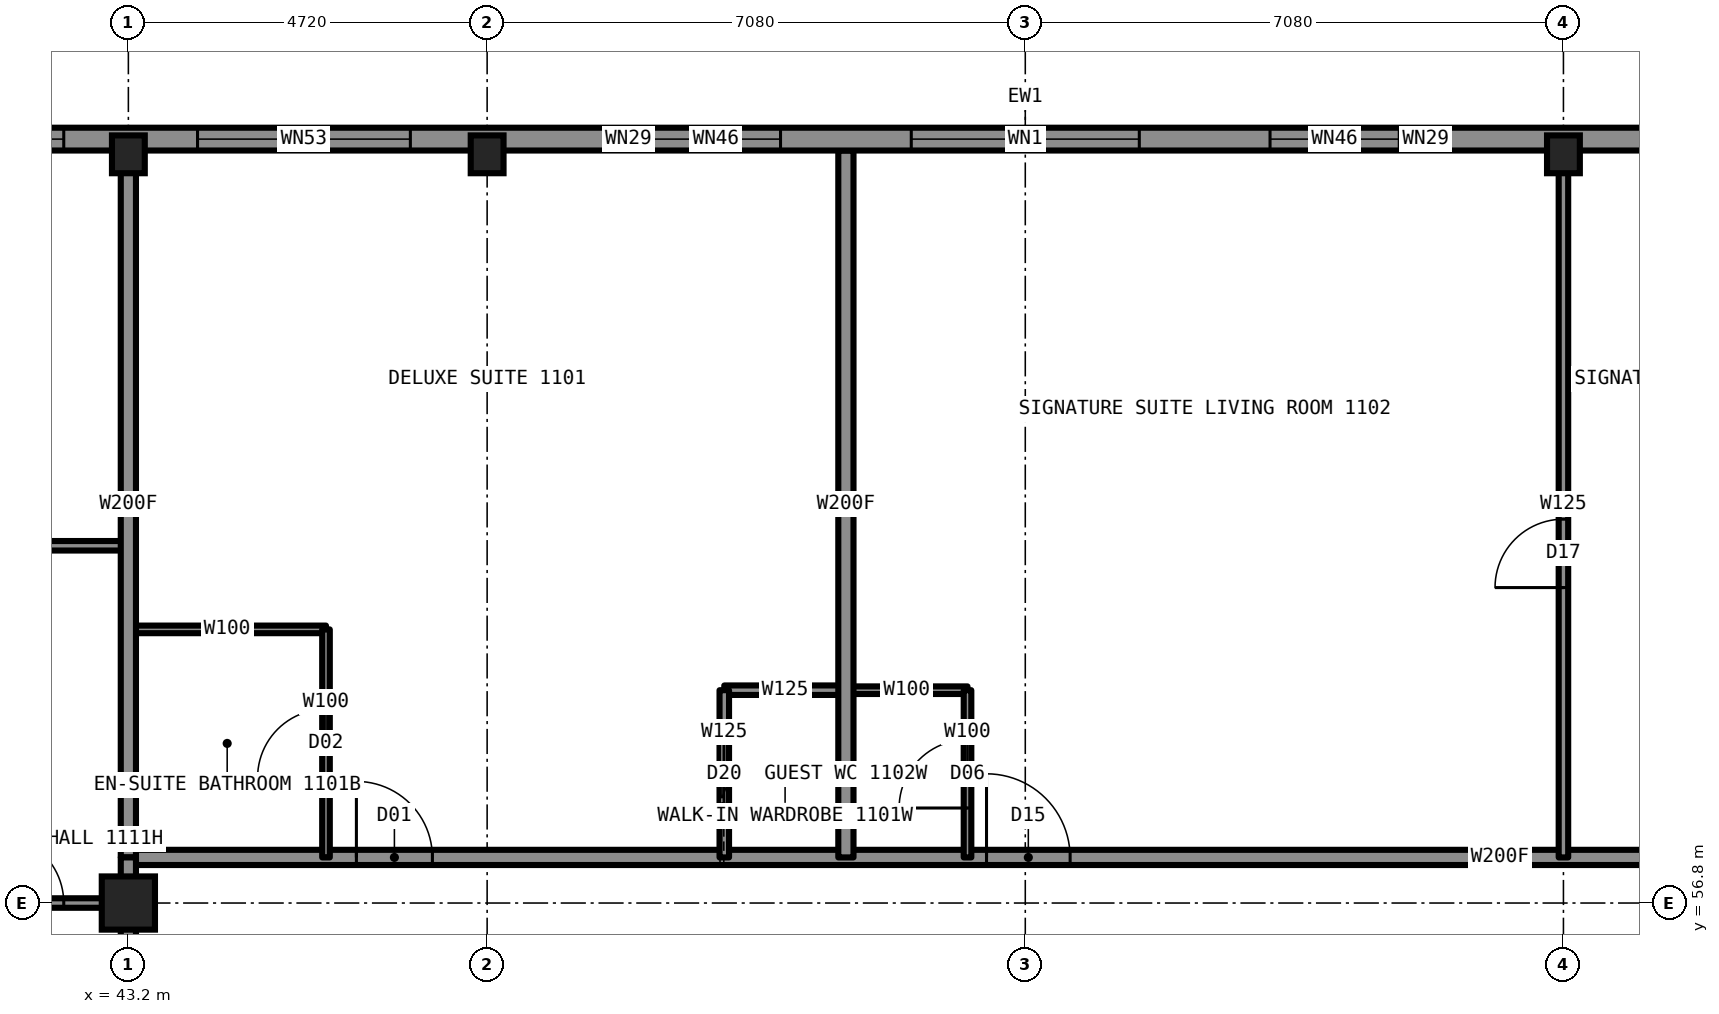
"""IFC4 building model, lengths in metres.
Left out: names, types, materials, properties, quantities, classifications, styles, units other than length and angle.
Written with IfcOpenShell. Run it as: python <this file> out.ifc"""

import sys

from ifc_helpers import new_model, si_unit, direction, frame, frame_2d, origin, origin_2d, place, context, subcontext, project, spatial, rectangle, hollow_rectangle, i_section, extrude, element, fill, save


model = new_model("IFC4")
c1 = context("Model", 3, precision=1e-05, world=origin(), true_north=direction((0.0, 1.0)))
c2 = subcontext(c1, "Body", "Model", "MODEL_VIEW")
j1 = project(units=[si_unit("LENGTHUNIT", "METRE"), si_unit("PLANEANGLEUNIT", "RADIAN")], contexts=[c1])
p1 = place(None, origin())
s1 = spatial("IfcSite", under=j1, at=p1, CompositionType="ELEMENT")
p2 = place(p1, origin())
s2 = spatial("IfcBuilding", under=s1, at=p2, CompositionType="ELEMENT")
p3 = place(p2, frame((0.0, 0.0, 39.0)))
s3 = spatial("IfcBuildingStorey", under=s2, at=p3, CompositionType="ELEMENT", Elevation=39.0)
for number, where, z_axis, x_axis in (
    (1, (43.2, 66.65, 0.0), (0.0, 0.0, 1.0), (1.0, 0.0, 0.0)),
    (2, (47.92, 66.65, 0.0), (0.0, 0.0, 1.0), (1.0, 0.0, 0.0)),
    (3, (62.08, 66.65, 0.0), (0.0, 0.0, 1.0), (1.0, 0.0, 0.0)),
):
    element("IfcColumn", number, at=place(p3, frame(where, z_axis=z_axis, x_axis=x_axis)), inside=s3, PredefinedType="COLUMN", context=c2, shape_type="SweptSolid", body=[
        extrude(i_section(OverallWidth=0.432, OverallDepth=0.498, WebThickness=0.056, FlangeThickness=0.089, at=origin_2d()), origin(), (0.0, 0.0, 1.0), 3.5),
    ])
p4 = place(p3, frame((43.2, 56.8, 0.0), z_axis=(0.0, 0.0, 1.0), x_axis=(1.0, 0.0, 0.0)))
e4 = element("IfcColumn", 4, at=p4, inside=s3, PredefinedType="COLUMN", context=c2, shape_type="SweptSolid", body=[
    extrude(hollow_rectangle(XDim=0.7, YDim=0.7, WallThickness=0.06, at=origin_2d()), origin(), (0.0, 0.0, 1.0), 3.5),
])
p5 = place(p3, frame((33.3, 56.8, 0.0), z_axis=(0.0, 0.0, 1.0), x_axis=(1.0, 0.0, 0.0)))
e5 = element("IfcWall", 5, at=p5, inside=s3, PredefinedType="PARTITIONING", context=c2, shape_type="SweptSolid", body=[
    extrude(rectangle(XDim=9.9, YDim=0.125, at=frame_2d((4.95, 0.0))), origin(), (0.0, 0.0, 1.0), 2.573),
])
p6 = place(p5, frame((8.15, 0.0, 0.0)))
e6 = element("IfcOpeningElement", 6, at=p6, cuts=e5, PredefinedType="OPENING", context=c2, shape_type="SweptSolid", body=[
    extrude(rectangle(XDim=0.9, YDim=2.2, at=frame_2d((0.45, 1.1))), frame((0.0, 0.073, 0.0), z_axis=(0.0, -1.0, 0.0), x_axis=(1.0, 0.0, 0.0)), (0.0, 0.0, 1.0), 0.145),
])
p7 = place(p3, frame((43.2, 57.4, 0.0), z_axis=(0.0, 0.0, 1.0), x_axis=(1.0, 0.0, 0.0)))
e7 = element("IfcWall", 7, at=p7, inside=s3, PredefinedType="PARTITIONING", context=c2, shape_type="SweptSolid", body=[
    extrude(rectangle(XDim=23.6, YDim=0.2, at=frame_2d((11.8, 0.0))), origin(), (0.0, 0.0, 1.0), 3.33),
])
p8 = place(p7, frame((3.0, 0.0, 0.0)))
e8 = element("IfcOpeningElement", 8, at=p8, cuts=e7, PredefinedType="OPENING", context=c2, shape_type="SweptSolid", body=[
    extrude(rectangle(XDim=1.0, YDim=2.2, at=frame_2d((0.5, 1.1))), frame((0.0, 0.11, 0.0), z_axis=(0.0, -1.0, 0.0), x_axis=(1.0, 0.0, 0.0)), (0.0, 0.0, 1.0), 0.22),
])
p9 = place(p7, frame((11.29, 0.0, 0.0)))
e9 = element("IfcOpeningElement", 9, at=p9, cuts=e7, PredefinedType="OPENING", context=c2, shape_type="SweptSolid", body=[
    extrude(rectangle(XDim=1.1, YDim=2.2, at=frame_2d((0.55, 1.1))), frame((0.0, 0.11, 0.0), z_axis=(0.0, -1.0, 0.0), x_axis=(1.0, 0.0, 0.0)), (0.0, 0.0, 1.0), 0.22),
])
p10 = place(p3, frame((52.64, 59.6, 0.0), z_axis=(0.0, 0.0, 1.0), x_axis=(1.0, 0.0, 0.0)))
e10 = element("IfcWall", 10, at=p10, inside=s3, PredefinedType="PARTITIONING", context=c2, shape_type="SweptSolid", body=[
    extrude(rectangle(XDim=1.6, YDim=0.1, at=frame_2d((0.8, 0.0))), origin(), (0.0, 0.0, 1.0), 3.33),
])
p11 = place(p3, frame((51.04, 59.6, 0.0), z_axis=(0.0, 0.0, 1.0), x_axis=(1.0, 0.0, 0.0)))
e11 = element("IfcWall", 11, at=p11, inside=s3, PredefinedType="PARTITIONING", context=c2, shape_type="SweptSolid", body=[
    extrude(rectangle(XDim=1.6, YDim=0.125, at=frame_2d((0.8, 0.0))), origin(), (0.0, 0.0, 1.0), 3.33),
])
p12 = place(p3, frame((43.2, 60.4, 0.0), z_axis=(0.0, 0.0, 1.0), x_axis=(1.0, 0.0, 0.0)))
e12 = element("IfcWall", 12, at=p12, inside=s3, PredefinedType="PARTITIONING", context=c2, shape_type="SweptSolid", body=[
    extrude(rectangle(XDim=2.6, YDim=0.1, at=frame_2d((1.3, 0.0))), origin(), (0.0, 0.0, 1.0), 3.33),
])
p13 = place(p3, frame((33.306, 61.5, 0.0), z_axis=(0.0, 0.0, 1.0), x_axis=(1.0, 0.0, 0.0)))
e13 = element("IfcWall", 13, at=p13, inside=s3, PredefinedType="PARTITIONING", context=c2, shape_type="SweptSolid", body=[
    extrude(rectangle(XDim=9.894, YDim=0.125, at=frame_2d((4.947, 0.0))), origin(), (0.0, 0.0, 1.0), 3.33),
])
p14 = place(p13, frame((7.244, 0.0, 0.0)))
e14 = element("IfcOpeningElement", 14, at=p14, cuts=e13, PredefinedType="OPENING", context=c2, shape_type="SweptSolid", body=[
    extrude(rectangle(XDim=0.9, YDim=2.2, at=frame_2d((0.45, 1.1))), frame((0.0, 0.073, 0.0), z_axis=(0.0, -1.0, 0.0), x_axis=(1.0, 0.0, 0.0)), (0.0, 0.0, 1.0), 0.145),
])
p15 = place(p3, frame((54.24, 57.4, 0.0), z_axis=(0.0, 0.0, 1.0), x_axis=(0.0, 1.0, 0.0)))
e15 = element("IfcWall", 15, at=p15, inside=s3, PredefinedType="PARTITIONING", context=c2, shape_type="SweptSolid", body=[
    extrude(rectangle(XDim=2.2, YDim=0.1, at=frame_2d((1.1, 0.0))), origin(), (0.0, 0.0, 1.0), 3.33),
])
p16 = place(p15, frame((0.65, 0.0, 0.0)))
e16 = element("IfcOpeningElement", 16, at=p16, cuts=e15, PredefinedType="OPENING", context=c2, shape_type="SweptSolid", body=[
    extrude(rectangle(XDim=0.9, YDim=2.1, at=frame_2d((0.45, 1.05))), frame((0.0, 0.06, 0.0), z_axis=(0.0, -1.0, 0.0), x_axis=(1.0, 0.0, 0.0)), (0.0, 0.0, 1.0), 0.12),
])
p17 = place(p3, frame((43.2, 33.2, 0.0), z_axis=(0.0, 0.0, 1.0), x_axis=(0.0, 1.0, 0.0)))
e17 = element("IfcWall", 17, at=p17, inside=s3, PredefinedType="PARTITIONING", context=c2, shape_type="SweptSolid", body=[
    extrude(rectangle(XDim=23.58, YDim=0.2, at=frame_2d((11.79, 0.0))), origin(), (0.0, 0.0, 1.0), 3.33),
])
p18 = place(p17, frame((7.27, 0.0, 0.0)))
e18 = element("IfcOpeningElement", 18, at=p18, cuts=e17, PredefinedType="OPENING", context=c2, shape_type="SweptSolid", body=[
    extrude(rectangle(XDim=1.0, YDim=2.2, at=frame_2d((0.5, 1.1))), frame((0.0, 0.11, 0.0), z_axis=(0.0, -1.0, 0.0), x_axis=(1.0, 0.0, 0.0)), (0.0, 0.0, 1.0), 0.22),
])
p19 = place(p17, frame((12.44, 0.0, 0.0)))
e19 = element("IfcOpeningElement", 19, at=p19, cuts=e17, PredefinedType="OPENING", context=c2, shape_type="SweptSolid", body=[
    extrude(rectangle(XDim=1.0, YDim=2.2, at=frame_2d((0.5, 1.1))), frame((0.0, 0.11, 0.0), z_axis=(0.0, -1.0, 0.0), x_axis=(1.0, 0.0, 0.0)), (0.0, 0.0, 1.0), 0.22),
])
p20 = place(p17, frame((21.84, 0.0, 0.0)))
e20 = element("IfcOpeningElement", 20, at=p20, cuts=e17, PredefinedType="OPENING", context=c2, shape_type="SweptSolid", body=[
    extrude(rectangle(XDim=1.1, YDim=2.2, at=frame_2d((0.55, 1.1))), frame((0.0, 0.11, 0.0), z_axis=(0.0, -1.0, 0.0), x_axis=(1.0, 0.0, 0.0)), (0.0, 0.0, 1.0), 0.22),
])
p21 = place(p17, frame((0.66, 0.0, 0.0)))
e21 = element("IfcOpeningElement", 21, at=p21, cuts=e17, PredefinedType="OPENING", context=c2, shape_type="SweptSolid", body=[
    extrude(rectangle(XDim=1.1, YDim=2.2, at=frame_2d((0.55, 1.1))), frame((0.0, 0.11, 0.0), z_axis=(0.0, -1.0, 0.0), x_axis=(1.0, 0.0, 0.0)), (0.0, 0.0, 1.0), 0.22),
])
p22 = place(p3, frame((43.2, 57.4, 0.0), z_axis=(0.0, 0.0, 1.0), x_axis=(0.0, 1.0, 0.0)))
e22 = element("IfcWall", 22, at=p22, inside=s3, PredefinedType="PARTITIONING", context=c2, shape_type="SweptSolid", body=[
    extrude(rectangle(XDim=9.3, YDim=0.2, at=frame_2d((4.65, 0.0))), origin(), (0.0, 0.0, 1.0), 2.573),
])
p23 = place(p3, frame((52.64, 57.4, 0.0), z_axis=(0.0, 0.0, 1.0), x_axis=(0.0, 1.0, 0.0)))
e23 = element("IfcWall", 23, at=p23, inside=s3, PredefinedType="PARTITIONING", context=c2, shape_type="SweptSolid", body=[
    extrude(rectangle(XDim=9.3, YDim=0.2, at=frame_2d((4.65, 0.0))), origin(), (0.0, 0.0, 1.0), 3.33),
])
p24 = place(p3, frame((51.04, 57.4, 0.0), z_axis=(0.0, 0.0, 1.0), x_axis=(0.0, 1.0, 0.0)))
e24 = element("IfcWall", 24, at=p24, inside=s3, PredefinedType="PARTITIONING", context=c2, shape_type="SweptSolid", body=[
    extrude(rectangle(XDim=2.2, YDim=0.125, at=frame_2d((1.1, 0.0))), origin(), (0.0, 0.0, 1.0), 3.33),
])
p25 = place(p24, frame((0.7, 0.0, 0.0)))
e25 = element("IfcOpeningElement", 25, at=p25, cuts=e24, PredefinedType="OPENING", context=c2, shape_type="SweptSolid", body=[
    extrude(rectangle(XDim=0.8, YDim=2.1, at=frame_2d((0.4, 1.05))), frame((0.0, 0.073, 0.0), z_axis=(0.0, -1.0, 0.0), x_axis=(1.0, 0.0, 0.0)), (0.0, 0.0, 1.0), 0.145),
])
p26 = place(p3, frame((45.8, 57.4, 0.0), z_axis=(0.0, 0.0, 1.0), x_axis=(0.0, 1.0, 0.0)))
e26 = element("IfcWall", 26, at=p26, inside=s3, PredefinedType="PARTITIONING", context=c2, shape_type="SweptSolid", body=[
    extrude(rectangle(XDim=3.0, YDim=0.1, at=frame_2d((1.5, 0.0))), origin(), (0.0, 0.0, 1.0), 3.33),
])
p27 = place(p26, frame((1.05, 0.0, 0.0)))
e27 = element("IfcOpeningElement", 27, at=p27, cuts=e26, PredefinedType="OPENING", context=c2, shape_type="SweptSolid", body=[
    extrude(rectangle(XDim=0.9, YDim=2.1, at=frame_2d((0.45, 1.05))), frame((0.0, 0.06, 0.0), z_axis=(0.0, -1.0, 0.0), x_axis=(1.0, 0.0, 0.0)), (0.0, 0.0, 1.0), 0.12),
])
p28 = place(p3, frame((62.08, 57.4, 0.0), z_axis=(0.0, 0.0, 1.0), x_axis=(0.0, 1.0, 0.0)))
e28 = element("IfcWall", 28, at=p28, inside=s3, PredefinedType="PARTITIONING", context=c2, shape_type="SweptSolid", body=[
    extrude(rectangle(XDim=9.3, YDim=0.125, at=frame_2d((4.65, 0.0))), origin(), (0.0, 0.0, 1.0), 2.573),
])
p29 = place(p28, frame((3.55, 0.0, 0.0)))
e29 = element("IfcOpeningElement", 29, at=p29, cuts=e28, PredefinedType="OPENING", context=c2, shape_type="SweptSolid", body=[
    extrude(rectangle(XDim=0.9, YDim=2.2, at=frame_2d((0.45, 1.1))), frame((0.0, 0.073, 0.0), z_axis=(0.0, -1.0, 0.0), x_axis=(1.0, 0.0, 0.0)), (0.0, 0.0, 1.0), 0.145),
])
p30 = place(p3, frame((71.5, 66.85, 0.0), z_axis=(0.0, 0.0, 1.0), x_axis=(-1.0, 0.0, 0.0)))
e30 = element("IfcWall", 30, at=p30, inside=s3, PredefinedType="SOLIDWALL", context=c2, shape_type="SweptSolid", body=[
    extrude(rectangle(XDim=33.0, YDim=0.3, at=frame_2d((16.5, 0.0))), origin(), (0.0, 0.0, 1.0), 2.83),
])
p31 = place(p30, frame((0.85, 0.0, 0.5)))
e31 = element("IfcOpeningElement", 31, at=p31, cuts=e30, PredefinedType="OPENING", context=c2, shape_type="SweptSolid", body=[
    extrude(rectangle(XDim=2.5, YDim=2.0, at=frame_2d((1.25, 1.0))), frame((0.0, 0.16, 0.0), z_axis=(0.0, -1.0, 0.0), x_axis=(1.0, 0.0, 0.0)), (0.0, 0.0, 1.0), 0.32),
])
p32 = place(p30, frame((6.61, 0.0, 0.5)))
e32 = element("IfcOpeningElement", 32, at=p32, cuts=e30, PredefinedType="OPENING", context=c2, shape_type="SweptSolid", body=[
    extrude(rectangle(XDim=1.9, YDim=1.9, at=frame_2d((0.95, 0.95))), frame((0.0, 0.16, 0.0), z_axis=(0.0, -1.0, 0.0), x_axis=(1.0, 0.0, 0.0)), (0.0, 0.0, 1.0), 0.32),
])
p33 = place(p30, frame((10.28, 0.0, 0.5)))
e33 = element("IfcOpeningElement", 33, at=p33, cuts=e30, PredefinedType="OPENING", context=c2, shape_type="SweptSolid", body=[
    extrude(rectangle(XDim=3.0, YDim=2.0, at=frame_2d((1.5, 1.0))), frame((0.0, 0.16, 0.0), z_axis=(0.0, -1.0, 0.0), x_axis=(1.0, 0.0, 0.0)), (0.0, 0.0, 1.0), 0.32),
])
p34 = place(p30, frame((15.0, 0.0, 0.5)))
e34 = element("IfcOpeningElement", 34, at=p34, cuts=e30, PredefinedType="OPENING", context=c2, shape_type="SweptSolid", body=[
    extrude(rectangle(XDim=3.0, YDim=2.0, at=frame_2d((1.5, 1.0))), frame((0.0, 0.16, 0.0), z_axis=(0.0, -1.0, 0.0), x_axis=(1.0, 0.0, 0.0)), (0.0, 0.0, 1.0), 0.32),
])
p35 = place(p30, frame((19.72, 0.0, 0.5)))
e35 = element("IfcOpeningElement", 35, at=p35, cuts=e30, PredefinedType="OPENING", context=c2, shape_type="SweptSolid", body=[
    extrude(rectangle(XDim=3.0, YDim=2.0, at=frame_2d((1.5, 1.0))), frame((0.0, 0.16, 0.0), z_axis=(0.0, -1.0, 0.0), x_axis=(1.0, 0.0, 0.0)), (0.0, 0.0, 1.0), 0.32),
])
p36 = place(p30, frame((24.44, 0.0, 0.5)))
e36 = element("IfcOpeningElement", 36, at=p36, cuts=e30, PredefinedType="OPENING", context=c2, shape_type="SweptSolid", body=[
    extrude(rectangle(XDim=1.9, YDim=1.9, at=frame_2d((0.95, 0.95))), frame((0.0, 0.16, 0.0), z_axis=(0.0, -1.0, 0.0), x_axis=(1.0, 0.0, 0.0)), (0.0, 0.0, 1.0), 0.32),
])
p37 = place(p30, frame((29.6, 0.0, 0.5)))
e37 = element("IfcOpeningElement", 37, at=p37, cuts=e30, PredefinedType="OPENING", context=c2, shape_type="SweptSolid", body=[
    extrude(rectangle(XDim=2.5, YDim=2.0, at=frame_2d((1.25, 1.0))), frame((0.0, 0.16, 0.0), z_axis=(0.0, -1.0, 0.0), x_axis=(1.0, 0.0, 0.0)), (0.0, 0.0, 1.0), 0.32),
])
p38 = place(p30, frame((5.91, 0.0, 0.5)))
e38 = element("IfcOpeningElement", 38, at=p38, cuts=e30, PredefinedType="OPENING", context=c2, shape_type="SweptSolid", body=[
    extrude(rectangle(XDim=0.7, YDim=1.0, at=frame_2d((0.35, 0.5))), frame((0.0, 0.16, 0.0), z_axis=(0.0, -1.0, 0.0), x_axis=(1.0, 0.0, 0.0)), (0.0, 0.0, 1.0), 0.32),
])
p39 = place(p30, frame((26.39, 0.0, 0.5)))
e39 = element("IfcOpeningElement", 39, at=p39, cuts=e30, PredefinedType="OPENING", context=c2, shape_type="SweptSolid", body=[
    extrude(rectangle(XDim=0.7, YDim=1.0, at=frame_2d((0.35, 0.5))), frame((0.0, 0.16, 0.0), z_axis=(0.0, -1.0, 0.0), x_axis=(1.0, 0.0, 0.0)), (0.0, 0.0, 1.0), 0.32),
])
p40 = place(p3, frame((43.2, 56.78, 0.0), z_axis=(0.0, 0.0, 1.0), x_axis=(0.0, 1.0, 0.0)))
e40 = element("IfcWall", 40, at=p40, inside=s3, PredefinedType="PARTITIONING", context=c2, shape_type="SweptSolid", body=[
    extrude(rectangle(XDim=0.62, YDim=0.2, at=frame_2d((0.31, 0.0))), origin(), (0.0, 0.0, 1.0), 2.573),
])
p41 = place(p8, origin())
e41 = element("IfcDoor", 41, at=p41, inside=s3, OperationType="SINGLE_SWING_LEFT", PredefinedType="DOOR", context=c2, shape_type="SweptSolid", body=[
    extrude(rectangle(XDim=1.0, YDim=2.2, at=frame_2d((0.5, 1.1))), frame((0.0, 0.025, 0.0), z_axis=(0.0, -1.0, 0.0), x_axis=(1.0, 0.0, 0.0)), (0.0, 0.0, 1.0), 0.05),
])
fill(e8, e41)
p42 = place(p27, origin())
e42 = element("IfcDoor", 42, at=p42, inside=s3, OperationType="SINGLE_SWING_RIGHT", PredefinedType="DOOR", context=c2, shape_type="SweptSolid", body=[
    extrude(rectangle(XDim=0.9, YDim=2.1, at=frame_2d((0.45, 1.05))), frame((0.0, 0.025, 0.0), z_axis=(0.0, -1.0, 0.0), x_axis=(1.0, 0.0, 0.0)), (0.0, 0.0, 1.0), 0.05),
])
fill(e27, e42)
p43 = place(p25, origin())
e43 = element("IfcDoor", 43, at=p43, inside=s3, OperationType="SLIDING_TO_LEFT", PredefinedType="DOOR", context=c2, shape_type="SweptSolid", body=[
    extrude(rectangle(XDim=0.8, YDim=2.1, at=frame_2d((0.4, 1.05))), frame((0.0, 0.025, 0.0), z_axis=(0.0, -1.0, 0.0), x_axis=(1.0, 0.0, 0.0)), (0.0, 0.0, 1.0), 0.05),
])
fill(e25, e43)
p44 = place(p9, origin())
e44 = element("IfcDoor", 44, at=p44, inside=s3, OperationType="SINGLE_SWING_LEFT", PredefinedType="DOOR", context=c2, shape_type="SweptSolid", body=[
    extrude(rectangle(XDim=1.1, YDim=2.2, at=frame_2d((0.55, 1.1))), frame((0.0, 0.025, 0.0), z_axis=(0.0, -1.0, 0.0), x_axis=(1.0, 0.0, 0.0)), (0.0, 0.0, 1.0), 0.05),
])
fill(e9, e44)
p45 = place(p29, origin())
e45 = element("IfcDoor", 45, at=p45, inside=s3, OperationType="SINGLE_SWING_LEFT", PredefinedType="DOOR", context=c2, shape_type="SweptSolid", body=[
    extrude(rectangle(XDim=0.9, YDim=2.2, at=frame_2d((0.45, 1.1))), frame((0.0, 0.025, 0.0), z_axis=(0.0, -1.0, 0.0), x_axis=(1.0, 0.0, 0.0)), (0.0, 0.0, 1.0), 0.05),
])
fill(e29, e45)
p46 = place(p16, origin())
e46 = element("IfcDoor", 46, at=p46, inside=s3, OperationType="SINGLE_SWING_LEFT", PredefinedType="DOOR", context=c2, shape_type="SweptSolid", body=[
    extrude(rectangle(XDim=0.9, YDim=2.1, at=frame_2d((0.45, 1.05))), frame((0.0, 0.025, 0.0), z_axis=(0.0, -1.0, 0.0), x_axis=(1.0, 0.0, 0.0)), (0.0, 0.0, 1.0), 0.05),
])
fill(e16, e46)
p47 = place(p6, origin())
e47 = element("IfcDoor", 47, at=p47, inside=s3, OperationType="SINGLE_SWING_LEFT", PredefinedType="DOOR", context=c2, shape_type="SweptSolid", body=[
    extrude(rectangle(XDim=0.9, YDim=2.2, at=frame_2d((0.45, 1.1))), frame((0.0, 0.025, 0.0), z_axis=(0.0, -1.0, 0.0), x_axis=(1.0, 0.0, 0.0)), (0.0, 0.0, 1.0), 0.05),
])
fill(e6, e47)
p48 = place(p32, origin())
e48 = element("IfcWindow", 48, at=p48, inside=s3, PartitioningType="SINGLE_PANEL", PredefinedType="WINDOW", context=c2, shape_type="SweptSolid", body=[
    extrude(rectangle(XDim=1.9, YDim=1.9, at=frame_2d((0.95, 0.95))), frame((0.0, 0.03, 0.0), z_axis=(0.0, -1.0, 0.0), x_axis=(1.0, 0.0, 0.0)), (0.0, 0.0, 1.0), 0.06),
])
fill(e32, e48)
p49 = place(p33, origin())
e49 = element("IfcWindow", 49, at=p49, inside=s3, PartitioningType="SINGLE_PANEL", PredefinedType="WINDOW", context=c2, shape_type="SweptSolid", body=[
    extrude(rectangle(XDim=3.0, YDim=2.0, at=frame_2d((1.5, 1.0))), frame((0.0, 0.03, 0.0), z_axis=(0.0, -1.0, 0.0), x_axis=(1.0, 0.0, 0.0)), (0.0, 0.0, 1.0), 0.06),
])
fill(e33, e49)
p50 = place(p34, origin())
e50 = element("IfcWindow", 50, at=p50, inside=s3, PartitioningType="SINGLE_PANEL", PredefinedType="WINDOW", context=c2, shape_type="SweptSolid", body=[
    extrude(rectangle(XDim=3.0, YDim=2.0, at=frame_2d((1.5, 1.0))), frame((0.0, 0.03, 0.0), z_axis=(0.0, -1.0, 0.0), x_axis=(1.0, 0.0, 0.0)), (0.0, 0.0, 1.0), 0.06),
])
fill(e34, e50)
p51 = place(p35, origin())
e51 = element("IfcWindow", 51, at=p51, inside=s3, PartitioningType="SINGLE_PANEL", PredefinedType="WINDOW", context=c2, shape_type="SweptSolid", body=[
    extrude(rectangle(XDim=3.0, YDim=2.0, at=frame_2d((1.5, 1.0))), frame((0.0, 0.03, 0.0), z_axis=(0.0, -1.0, 0.0), x_axis=(1.0, 0.0, 0.0)), (0.0, 0.0, 1.0), 0.06),
])
fill(e35, e51)
p52 = place(p36, origin())
e52 = element("IfcWindow", 52, at=p52, inside=s3, PartitioningType="SINGLE_PANEL", PredefinedType="WINDOW", context=c2, shape_type="SweptSolid", body=[
    extrude(rectangle(XDim=1.9, YDim=1.9, at=frame_2d((0.95, 0.95))), frame((0.0, 0.03, 0.0), z_axis=(0.0, -1.0, 0.0), x_axis=(1.0, 0.0, 0.0)), (0.0, 0.0, 1.0), 0.06),
])
fill(e36, e52)
p53 = place(p39, origin())
e53 = element("IfcWindow", 53, at=p53, inside=s3, PartitioningType="SINGLE_PANEL", PredefinedType="WINDOW", context=c2, shape_type="SweptSolid", body=[
    extrude(rectangle(XDim=0.7, YDim=1.0, at=frame_2d((0.35, 0.5))), frame((0.0, 0.03, 0.0), z_axis=(0.0, -1.0, 0.0), x_axis=(1.0, 0.0, 0.0)), (0.0, 0.0, 1.0), 0.06),
])
fill(e39, e53)
save(model, sys.argv[1])
